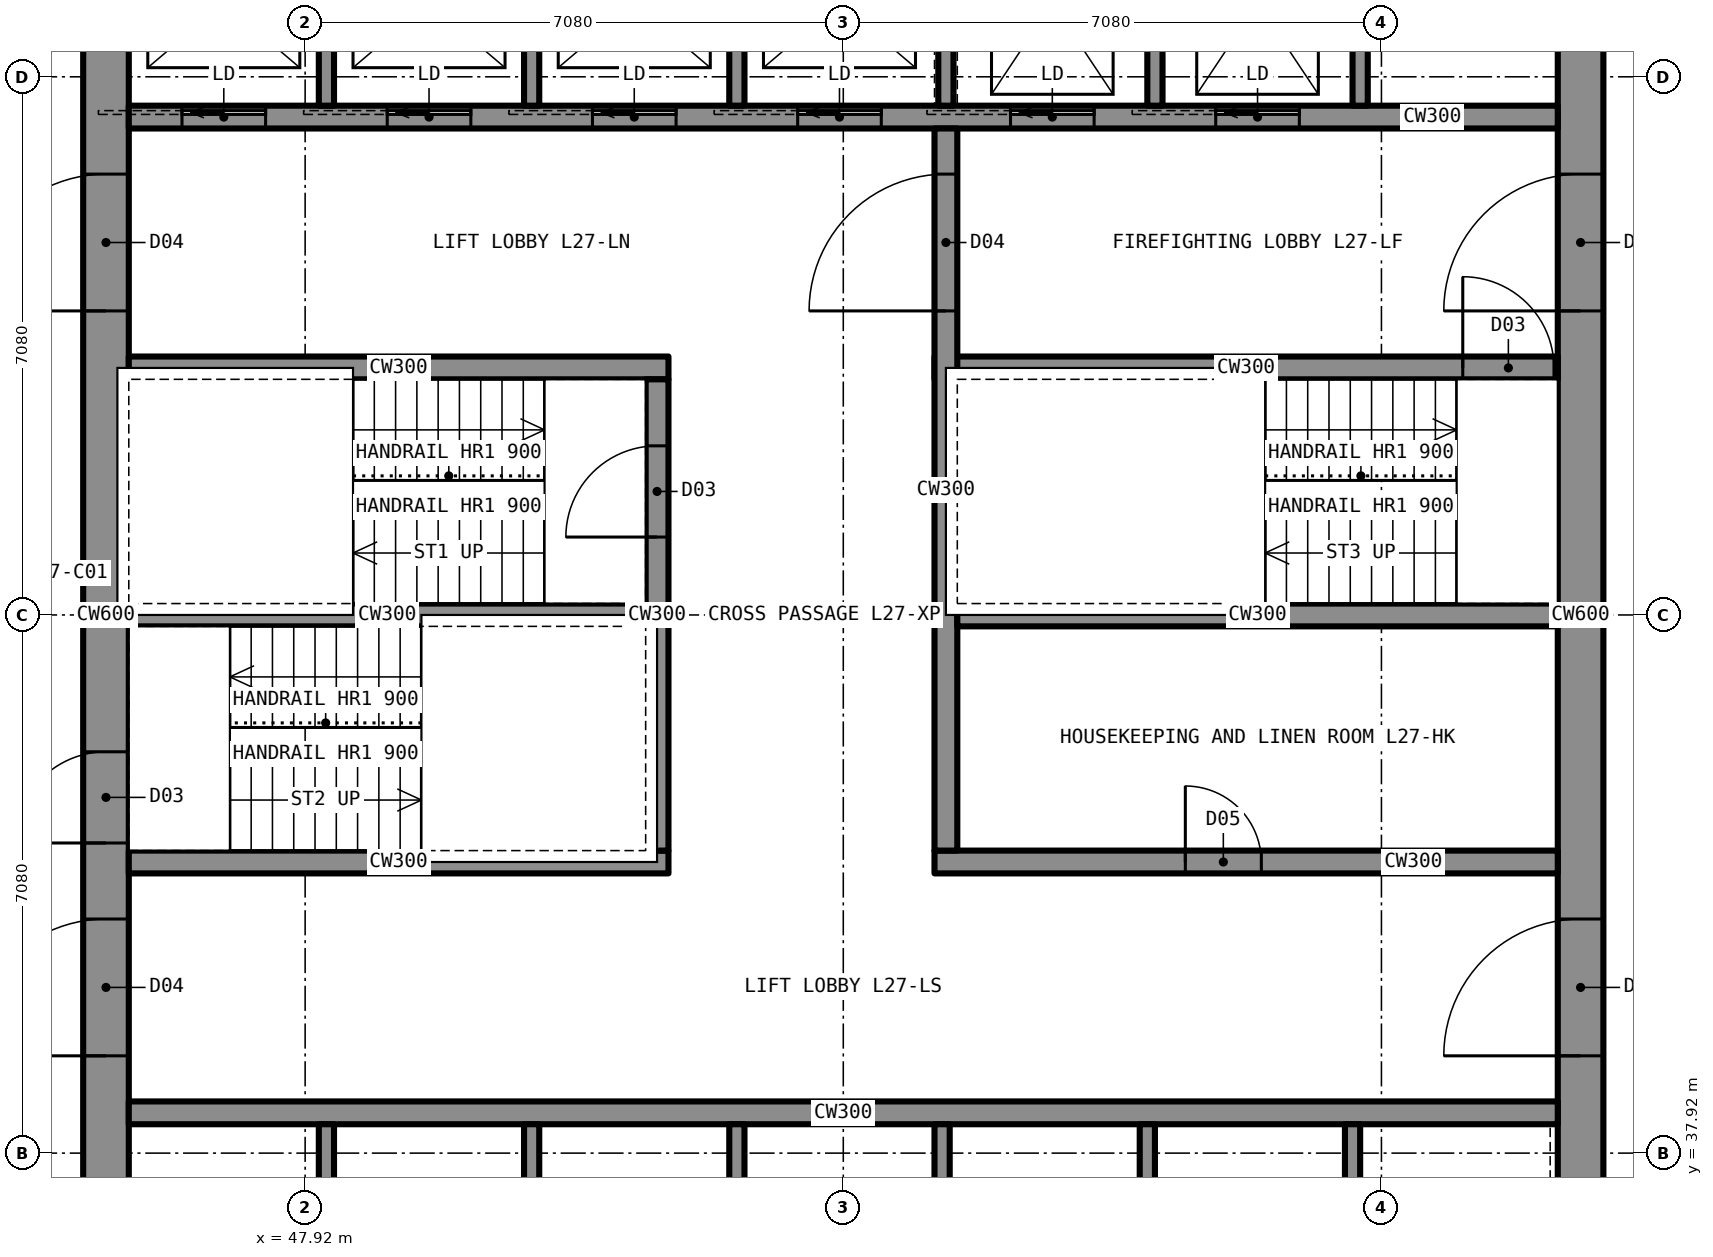
"""IFC4 building model, lengths in metres.
Left out: names, types, materials, properties, quantities, classifications, styles, units other than length and angle.
Written with IfcOpenShell. Run it as: python <this file> out.ifc"""

import sys

from ifc_helpers import new_model, si_unit, direction, frame, frame_2d, origin, place, context, subcontext, project, spatial, rectangle, extrude, element, fill, save


model = new_model("IFC4")
c1 = context("Model", 3, precision=1e-05, world=origin(), true_north=direction((0.0, 1.0)))
c2 = subcontext(c1, "Body", "Model", "MODEL_VIEW")
j1 = project(units=[si_unit("LENGTHUNIT", "METRE"), si_unit("PLANEANGLEUNIT", "RADIAN")], contexts=[c1])
p1 = place(None, origin())
s1 = spatial("IfcSite", under=j1, at=p1, CompositionType="ELEMENT")
p2 = place(p1, origin())
s2 = spatial("IfcBuilding", under=s1, at=p2, CompositionType="ELEMENT")
p3 = place(p2, frame((0.0, 0.0, 103.9)))
s3 = spatial("IfcBuildingStorey", under=s2, at=p3, CompositionType="ELEMENT", Elevation=103.9)
p4 = place(p3, frame((64.7, 35.6, 0.0), z_axis=(0.0, 0.0, 1.0), x_axis=(0.0, 1.0, 0.0)))
e1 = element("IfcWall", 1, at=p4, inside=s3, PredefinedType="SHEAR", context=c2, shape_type="SweptSolid", body=[
    extrude(rectangle(XDim=18.8, YDim=0.6, at=frame_2d((9.4, 0.0))), origin(), (0.0, 0.0, 1.0), 3.5),
])
p5 = place(p4, frame((13.4, 0.0, 0.0)))
e2 = element("IfcOpeningElement", 2, at=p5, cuts=e1, PredefinedType="OPENING", context=c2, shape_type="SweptSolid", body=[
    extrude(rectangle(XDim=1.8, YDim=2.2, at=frame_2d((0.9, 1.1))), frame((0.0, 0.31, 0.0), z_axis=(0.0, -1.0, 0.0), x_axis=(1.0, 0.0, 0.0)), (0.0, 0.0, 1.0), 0.62),
])
p6 = place(p4, frame((3.6, 0.0, 0.0)))
e3 = element("IfcOpeningElement", 3, at=p6, cuts=e1, PredefinedType="OPENING", context=c2, shape_type="SweptSolid", body=[
    extrude(rectangle(XDim=1.8, YDim=2.2, at=frame_2d((0.9, 1.1))), frame((0.0, 0.31, 0.0), z_axis=(0.0, -1.0, 0.0), x_axis=(1.0, 0.0, 0.0)), (0.0, 0.0, 1.0), 0.62),
])
p7 = place(p3, frame((45.3, 35.6, 0.0), z_axis=(0.0, 0.0, 1.0), x_axis=(0.0, 1.0, 0.0)))
e4 = element("IfcWall", 4, at=p7, inside=s3, PredefinedType="SHEAR", context=c2, shape_type="SweptSolid", body=[
    extrude(rectangle(XDim=18.8, YDim=0.6, at=frame_2d((9.4, 0.0))), origin(), (0.0, 0.0, 1.0), 3.5),
])
p8 = place(p7, frame((13.4, 0.0, 0.0)))
e5 = element("IfcOpeningElement", 5, at=p8, cuts=e4, PredefinedType="OPENING", context=c2, shape_type="SweptSolid", body=[
    extrude(rectangle(XDim=1.8, YDim=2.2, at=frame_2d((0.9, 1.1))), frame((0.0, 0.31, 0.0), z_axis=(0.0, -1.0, 0.0), x_axis=(1.0, 0.0, 0.0)), (0.0, 0.0, 1.0), 0.62),
])
p9 = place(p7, frame((3.6, 0.0, 0.0)))
e6 = element("IfcOpeningElement", 6, at=p9, cuts=e4, PredefinedType="OPENING", context=c2, shape_type="SweptSolid", body=[
    extrude(rectangle(XDim=1.8, YDim=2.2, at=frame_2d((0.9, 1.1))), frame((0.0, 0.31, 0.0), z_axis=(0.0, -1.0, 0.0), x_axis=(1.0, 0.0, 0.0)), (0.0, 0.0, 1.0), 0.62),
])
p10 = place(p7, frame((6.4, 0.0, 0.0)))
e7 = element("IfcOpeningElement", 7, at=p10, cuts=e4, PredefinedType="OPENING", context=c2, shape_type="SweptSolid", body=[
    extrude(rectangle(XDim=1.2, YDim=2.2, at=frame_2d((0.6, 1.1))), frame((0.0, 0.31, 0.0), z_axis=(0.0, -1.0, 0.0), x_axis=(1.0, 0.0, 0.0)), (0.0, 0.0, 1.0), 0.62),
])
p11 = place(p3, frame((45.6, 51.55, 0.0), z_axis=(0.0, 0.0, 1.0), x_axis=(1.0, 0.0, 0.0)))
e8 = element("IfcWall", 8, at=p11, inside=s3, PredefinedType="SHEAR", context=c2, shape_type="SweptSolid", body=[
    extrude(rectangle(XDim=18.8, YDim=0.3, at=frame_2d((9.4, 0.0))), origin(), (0.0, 0.0, 1.0), 3.5),
])
p12 = place(p11, frame((0.7, 0.0, 0.0)))
e9 = element("IfcOpeningElement", 9, at=p12, cuts=e8, PredefinedType="OPENING", context=c2, shape_type="SweptSolid", body=[
    extrude(rectangle(XDim=1.1, YDim=2.2, at=frame_2d((0.55, 1.1))), frame((0.0, 0.16, 0.0), z_axis=(0.0, -1.0, 0.0), x_axis=(1.0, 0.0, 0.0)), (0.0, 0.0, 1.0), 0.32),
])
p13 = place(p11, frame((3.4, 0.0, 0.0)))
e10 = element("IfcOpeningElement", 10, at=p13, cuts=e8, PredefinedType="OPENING", context=c2, shape_type="SweptSolid", body=[
    extrude(rectangle(XDim=1.1, YDim=2.2, at=frame_2d((0.55, 1.1))), frame((0.0, 0.16, 0.0), z_axis=(0.0, -1.0, 0.0), x_axis=(1.0, 0.0, 0.0)), (0.0, 0.0, 1.0), 0.32),
])
p14 = place(p11, frame((6.1, 0.0, 0.0)))
e11 = element("IfcOpeningElement", 11, at=p14, cuts=e8, PredefinedType="OPENING", context=c2, shape_type="SweptSolid", body=[
    extrude(rectangle(XDim=1.1, YDim=2.2, at=frame_2d((0.55, 1.1))), frame((0.0, 0.16, 0.0), z_axis=(0.0, -1.0, 0.0), x_axis=(1.0, 0.0, 0.0)), (0.0, 0.0, 1.0), 0.32),
])
p15 = place(p11, frame((8.8, 0.0, 0.0)))
e12 = element("IfcOpeningElement", 12, at=p15, cuts=e8, PredefinedType="OPENING", context=c2, shape_type="SweptSolid", body=[
    extrude(rectangle(XDim=1.1, YDim=2.2, at=frame_2d((0.55, 1.1))), frame((0.0, 0.16, 0.0), z_axis=(0.0, -1.0, 0.0), x_axis=(1.0, 0.0, 0.0)), (0.0, 0.0, 1.0), 0.32),
])
p16 = place(p11, frame((11.6, 0.0, 0.0)))
e13 = element("IfcOpeningElement", 13, at=p16, cuts=e8, PredefinedType="OPENING", context=c2, shape_type="SweptSolid", body=[
    extrude(rectangle(XDim=1.1, YDim=2.2, at=frame_2d((0.55, 1.1))), frame((0.0, 0.16, 0.0), z_axis=(0.0, -1.0, 0.0), x_axis=(1.0, 0.0, 0.0)), (0.0, 0.0, 1.0), 0.32),
])
p17 = place(p11, frame((14.3, 0.0, 0.0)))
e14 = element("IfcOpeningElement", 14, at=p17, cuts=e8, PredefinedType="OPENING", context=c2, shape_type="SweptSolid", body=[
    extrude(rectangle(XDim=1.1, YDim=2.2, at=frame_2d((0.55, 1.1))), frame((0.0, 0.16, 0.0), z_axis=(0.0, -1.0, 0.0), x_axis=(1.0, 0.0, 0.0)), (0.0, 0.0, 1.0), 0.32),
])
p18 = place(p3, frame((45.6, 38.45, 0.0), z_axis=(0.0, 0.0, 1.0), x_axis=(1.0, 0.0, 0.0)))
e15 = element("IfcWall", 15, at=p18, inside=s3, PredefinedType="SHEAR", context=c2, shape_type="SweptSolid", body=[
    extrude(rectangle(XDim=18.8, YDim=0.3, at=frame_2d((9.4, 0.0))), origin(), (0.0, 0.0, 1.0), 3.5),
])
p19 = place(p3, frame((45.6, 48.25, 0.0), z_axis=(0.0, 0.0, 1.0), x_axis=(1.0, 0.0, 0.0)))
e16 = element("IfcWall", 16, at=p19, inside=s3, PredefinedType="SHEAR", context=c2, shape_type="SweptSolid", body=[
    extrude(rectangle(XDim=7.1, YDim=0.3, at=frame_2d((3.55, 0.0))), origin(), (0.0, 0.0, 1.0), 3.5),
])
p20 = place(p3, frame((56.2, 48.25, 0.0), z_axis=(0.0, 0.0, 1.0), x_axis=(1.0, 0.0, 0.0)))
e17 = element("IfcWall", 17, at=p20, inside=s3, PredefinedType="SHEAR", context=c2, shape_type="SweptSolid", body=[
    extrude(rectangle(XDim=8.2, YDim=0.3, at=frame_2d((4.1, 0.0))), origin(), (0.0, 0.0, 1.0), 3.5),
])
p21 = place(p20, frame((6.95, 0.0, 0.0)))
e18 = element("IfcOpeningElement", 18, at=p21, cuts=e17, PredefinedType="OPENING", context=c2, shape_type="SweptSolid", body=[
    extrude(rectangle(XDim=1.2, YDim=2.2, at=frame_2d((0.6, 1.1))), frame((0.0, 0.16, 0.0), z_axis=(0.0, -1.0, 0.0), x_axis=(1.0, 0.0, 0.0)), (0.0, 0.0, 1.0), 0.32),
])
p22 = place(p3, frame((45.6, 41.75, 0.0), z_axis=(0.0, 0.0, 1.0), x_axis=(1.0, 0.0, 0.0)))
e19 = element("IfcWall", 19, at=p22, inside=s3, PredefinedType="SHEAR", context=c2, shape_type="SweptSolid", body=[
    extrude(rectangle(XDim=7.1, YDim=0.3, at=frame_2d((3.55, 0.0))), origin(), (0.0, 0.0, 1.0), 3.5),
])
p23 = place(p3, frame((56.2, 41.75, 0.0), z_axis=(0.0, 0.0, 1.0), x_axis=(1.0, 0.0, 0.0)))
e20 = element("IfcWall", 20, at=p23, inside=s3, PredefinedType="SHEAR", context=c2, shape_type="SweptSolid", body=[
    extrude(rectangle(XDim=8.2, YDim=0.3, at=frame_2d((4.1, 0.0))), origin(), (0.0, 0.0, 1.0), 3.5),
])
p24 = place(p23, frame((3.3, 0.0, 0.0)))
e21 = element("IfcOpeningElement", 21, at=p24, cuts=e20, PredefinedType="OPENING", context=c2, shape_type="SweptSolid", body=[
    extrude(rectangle(XDim=1.0, YDim=2.1, at=frame_2d((0.5, 1.05))), frame((0.0, 0.16, 0.0), z_axis=(0.0, -1.0, 0.0), x_axis=(1.0, 0.0, 0.0)), (0.0, 0.0, 1.0), 0.32),
])
p25 = place(p3, frame((52.55, 41.9, 0.0), z_axis=(0.0, 0.0, 1.0), x_axis=(0.0, 1.0, 0.0)))
e22 = element("IfcWall", 22, at=p25, inside=s3, PredefinedType="SHEAR", context=c2, shape_type="SweptSolid", body=[
    extrude(rectangle(XDim=6.2, YDim=0.3, at=frame_2d((3.1, 0.0))), origin(), (0.0, 0.0, 1.0), 3.5),
])
p26 = place(p25, frame((4.125, 0.0, 0.0)))
e23 = element("IfcOpeningElement", 23, at=p26, cuts=e22, PredefinedType="OPENING", context=c2, shape_type="SweptSolid", body=[
    extrude(rectangle(XDim=1.2, YDim=2.2, at=frame_2d((0.6, 1.1))), frame((0.0, 0.16, 0.0), z_axis=(0.0, -1.0, 0.0), x_axis=(1.0, 0.0, 0.0)), (0.0, 0.0, 1.0), 0.32),
])
p27 = place(p3, frame((56.35, 41.9, 0.0), z_axis=(0.0, 0.0, 1.0), x_axis=(0.0, 1.0, 0.0)))
e24 = element("IfcWall", 24, at=p27, inside=s3, PredefinedType="SHEAR", context=c2, shape_type="SweptSolid", body=[
    extrude(rectangle(XDim=9.5, YDim=0.3, at=frame_2d((4.75, 0.0))), origin(), (0.0, 0.0, 1.0), 3.5),
])
p28 = place(p27, frame((7.1, 0.0, 0.0)))
e25 = element("IfcOpeningElement", 25, at=p28, cuts=e24, PredefinedType="OPENING", context=c2, shape_type="SweptSolid", body=[
    extrude(rectangle(XDim=1.8, YDim=2.2, at=frame_2d((0.9, 1.1))), frame((0.0, 0.16, 0.0), z_axis=(0.0, -1.0, 0.0), x_axis=(1.0, 0.0, 0.0)), (0.0, 0.0, 1.0), 0.32),
])
p29 = place(p3, frame((45.6, 45.0, 0.0), z_axis=(0.0, 0.0, 1.0), x_axis=(1.0, 0.0, 0.0)))
e26 = element("IfcWall", 26, at=p29, inside=s3, PredefinedType="SHEAR", context=c2, shape_type="SweptSolid", body=[
    extrude(rectangle(XDim=6.8, YDim=0.3, at=frame_2d((3.4, 0.0))), origin(), (0.0, 0.0, 1.0), 3.5),
])
p30 = place(p3, frame((56.5, 45.0, 0.0), z_axis=(0.0, 0.0, 1.0), x_axis=(1.0, 0.0, 0.0)))
e27 = element("IfcWall", 27, at=p30, inside=s3, PredefinedType="SHEAR", context=c2, shape_type="SweptSolid", body=[
    extrude(rectangle(XDim=7.9, YDim=0.3, at=frame_2d((3.95, 0.0))), origin(), (0.0, 0.0, 1.0), 3.5),
])
for number, where, z_axis, x_axis in (
    (28, (48.2, 51.7, 0.0), (0.0, 0.0, 1.0), (0.0, 1.0, 0.0)),
    (29, (50.9, 51.7, 0.0), (0.0, 0.0, 1.0), (0.0, 1.0, 0.0)),
    (30, (53.6, 51.7, 0.0), (0.0, 0.0, 1.0), (0.0, 1.0, 0.0)),
    (31, (59.1, 51.7, 0.0), (0.0, 0.0, 1.0), (0.0, 1.0, 0.0)),
    (32, (61.8, 51.7, 0.0), (0.0, 0.0, 1.0), (0.0, 1.0, 0.0)),
    (33, (56.35, 51.7, 0.0), (0.0, 0.0, 1.0), (0.0, 1.0, 0.0)),
    (34, (48.2, 35.6, 0.0), (0.0, 0.0, 1.0), (0.0, 1.0, 0.0)),
    (35, (50.9, 35.6, 0.0), (0.0, 0.0, 1.0), (0.0, 1.0, 0.0)),
    (36, (53.6, 35.6, 0.0), (0.0, 0.0, 1.0), (0.0, 1.0, 0.0)),
    (37, (56.3, 35.6, 0.0), (0.0, 0.0, 1.0), (0.0, 1.0, 0.0)),
    (38, (59.0, 35.6, 0.0), (0.0, 0.0, 1.0), (0.0, 1.0, 0.0)),
    (39, (61.7, 35.6, 0.0), (0.0, 0.0, 1.0), (0.0, 1.0, 0.0)),
):
    element("IfcWall", number, at=place(p3, frame(where, z_axis=z_axis, x_axis=x_axis)), inside=s3, PredefinedType="PARTITIONING", context=c2, shape_type="SweptSolid", body=[
        extrude(rectangle(XDim=2.7, YDim=0.2, at=frame_2d((1.35, 0.0))), origin(), (0.0, 0.0, 1.0), 3.33),
    ])
p31 = place(p8, origin())
e40 = element("IfcDoor", 40, at=p31, inside=s3, OperationType="DOUBLE_DOOR_SINGLE_SWING", PredefinedType="DOOR", context=c2, shape_type="SweptSolid", body=[
    extrude(rectangle(XDim=1.8, YDim=2.2, at=frame_2d((0.9, 1.1))), frame((0.0, 0.025, 0.0), z_axis=(0.0, -1.0, 0.0), x_axis=(1.0, 0.0, 0.0)), (0.0, 0.0, 1.0), 0.05),
])
fill(e5, e40)
p32 = place(p9, origin())
e41 = element("IfcDoor", 41, at=p32, inside=s3, OperationType="DOUBLE_DOOR_SINGLE_SWING", PredefinedType="DOOR", context=c2, shape_type="SweptSolid", body=[
    extrude(rectangle(XDim=1.8, YDim=2.2, at=frame_2d((0.9, 1.1))), frame((0.0, 0.025, 0.0), z_axis=(0.0, -1.0, 0.0), x_axis=(1.0, 0.0, 0.0)), (0.0, 0.0, 1.0), 0.05),
])
fill(e6, e41)
p33 = place(p5, origin())
e42 = element("IfcDoor", 42, at=p33, inside=s3, OperationType="DOUBLE_DOOR_SINGLE_SWING", PredefinedType="DOOR", context=c2, shape_type="SweptSolid", body=[
    extrude(rectangle(XDim=1.8, YDim=2.2, at=frame_2d((0.9, 1.1))), frame((0.0, 0.025, 0.0), z_axis=(0.0, -1.0, 0.0), x_axis=(1.0, 0.0, 0.0)), (0.0, 0.0, 1.0), 0.05),
])
fill(e2, e42)
p34 = place(p6, origin())
e43 = element("IfcDoor", 43, at=p34, inside=s3, OperationType="DOUBLE_DOOR_SINGLE_SWING", PredefinedType="DOOR", context=c2, shape_type="SweptSolid", body=[
    extrude(rectangle(XDim=1.8, YDim=2.2, at=frame_2d((0.9, 1.1))), frame((0.0, 0.025, 0.0), z_axis=(0.0, -1.0, 0.0), x_axis=(1.0, 0.0, 0.0)), (0.0, 0.0, 1.0), 0.05),
])
fill(e3, e43)
p35 = place(p28, origin())
e44 = element("IfcDoor", 44, at=p35, inside=s3, OperationType="DOUBLE_DOOR_SINGLE_SWING", PredefinedType="DOOR", context=c2, shape_type="SweptSolid", body=[
    extrude(rectangle(XDim=1.8, YDim=2.2, at=frame_2d((0.9, 1.1))), frame((0.0, 0.025, 0.0), z_axis=(0.0, -1.0, 0.0), x_axis=(1.0, 0.0, 0.0)), (0.0, 0.0, 1.0), 0.05),
])
fill(e25, e44)
p36 = place(p26, origin())
e45 = element("IfcDoor", 45, at=p36, inside=s3, OperationType="SINGLE_SWING_LEFT", PredefinedType="DOOR", context=c2, shape_type="SweptSolid", body=[
    extrude(rectangle(XDim=1.2, YDim=2.2, at=frame_2d((0.6, 1.1))), frame((0.0, 0.025, 0.0), z_axis=(0.0, -1.0, 0.0), x_axis=(1.0, 0.0, 0.0)), (0.0, 0.0, 1.0), 0.05),
])
fill(e23, e45)
p37 = place(p10, origin())
e46 = element("IfcDoor", 46, at=p37, inside=s3, OperationType="SINGLE_SWING_LEFT", PredefinedType="DOOR", context=c2, shape_type="SweptSolid", body=[
    extrude(rectangle(XDim=1.2, YDim=2.2, at=frame_2d((0.6, 1.1))), frame((0.0, 0.025, 0.0), z_axis=(0.0, -1.0, 0.0), x_axis=(1.0, 0.0, 0.0)), (0.0, 0.0, 1.0), 0.05),
])
fill(e7, e46)
p38 = place(p21, origin())
e47 = element("IfcDoor", 47, at=p38, inside=s3, OperationType="SINGLE_SWING_LEFT", PredefinedType="DOOR", context=c2, shape_type="SweptSolid", body=[
    extrude(rectangle(XDim=1.2, YDim=2.2, at=frame_2d((0.6, 1.1))), frame((0.0, 0.025, 0.0), z_axis=(0.0, -1.0, 0.0), x_axis=(1.0, 0.0, 0.0)), (0.0, 0.0, 1.0), 0.05),
])
fill(e18, e47)
p39 = place(p24, origin())
e48 = element("IfcDoor", 48, at=p39, inside=s3, OperationType="SINGLE_SWING_LEFT", PredefinedType="DOOR", context=c2, shape_type="SweptSolid", body=[
    extrude(rectangle(XDim=1.0, YDim=2.1, at=frame_2d((0.5, 1.05))), frame((0.0, 0.025, 0.0), z_axis=(0.0, -1.0, 0.0), x_axis=(1.0, 0.0, 0.0)), (0.0, 0.0, 1.0), 0.05),
])
fill(e21, e48)
p40 = place(p12, origin())
e49 = element("IfcDoor", 49, at=p40, inside=s3, OperationType="SLIDING_TO_LEFT", PredefinedType="DOOR", context=c2, shape_type="SweptSolid", body=[
    extrude(rectangle(XDim=1.1, YDim=2.2, at=frame_2d((0.55, 1.1))), frame((0.0, 0.025, 0.0), z_axis=(0.0, -1.0, 0.0), x_axis=(1.0, 0.0, 0.0)), (0.0, 0.0, 1.0), 0.05),
])
fill(e9, e49)
p41 = place(p13, origin())
e50 = element("IfcDoor", 50, at=p41, inside=s3, OperationType="SLIDING_TO_LEFT", PredefinedType="DOOR", context=c2, shape_type="SweptSolid", body=[
    extrude(rectangle(XDim=1.1, YDim=2.2, at=frame_2d((0.55, 1.1))), frame((0.0, 0.025, 0.0), z_axis=(0.0, -1.0, 0.0), x_axis=(1.0, 0.0, 0.0)), (0.0, 0.0, 1.0), 0.05),
])
fill(e10, e50)
p42 = place(p14, origin())
e51 = element("IfcDoor", 51, at=p42, inside=s3, OperationType="SLIDING_TO_LEFT", PredefinedType="DOOR", context=c2, shape_type="SweptSolid", body=[
    extrude(rectangle(XDim=1.1, YDim=2.2, at=frame_2d((0.55, 1.1))), frame((0.0, 0.025, 0.0), z_axis=(0.0, -1.0, 0.0), x_axis=(1.0, 0.0, 0.0)), (0.0, 0.0, 1.0), 0.05),
])
fill(e11, e51)
p43 = place(p15, origin())
e52 = element("IfcDoor", 52, at=p43, inside=s3, OperationType="SLIDING_TO_LEFT", PredefinedType="DOOR", context=c2, shape_type="SweptSolid", body=[
    extrude(rectangle(XDim=1.1, YDim=2.2, at=frame_2d((0.55, 1.1))), frame((0.0, 0.025, 0.0), z_axis=(0.0, -1.0, 0.0), x_axis=(1.0, 0.0, 0.0)), (0.0, 0.0, 1.0), 0.05),
])
fill(e12, e52)
p44 = place(p16, origin())
e53 = element("IfcDoor", 53, at=p44, inside=s3, OperationType="SLIDING_TO_LEFT", PredefinedType="DOOR", context=c2, shape_type="SweptSolid", body=[
    extrude(rectangle(XDim=1.1, YDim=2.2, at=frame_2d((0.55, 1.1))), frame((0.0, 0.025, 0.0), z_axis=(0.0, -1.0, 0.0), x_axis=(1.0, 0.0, 0.0)), (0.0, 0.0, 1.0), 0.05),
])
fill(e13, e53)
p45 = place(p17, origin())
e54 = element("IfcDoor", 54, at=p45, inside=s3, OperationType="SLIDING_TO_LEFT", PredefinedType="DOOR", context=c2, shape_type="SweptSolid", body=[
    extrude(rectangle(XDim=1.1, YDim=2.2, at=frame_2d((0.55, 1.1))), frame((0.0, 0.025, 0.0), z_axis=(0.0, -1.0, 0.0), x_axis=(1.0, 0.0, 0.0)), (0.0, 0.0, 1.0), 0.05),
])
fill(e14, e54)
save(model, sys.argv[1])
